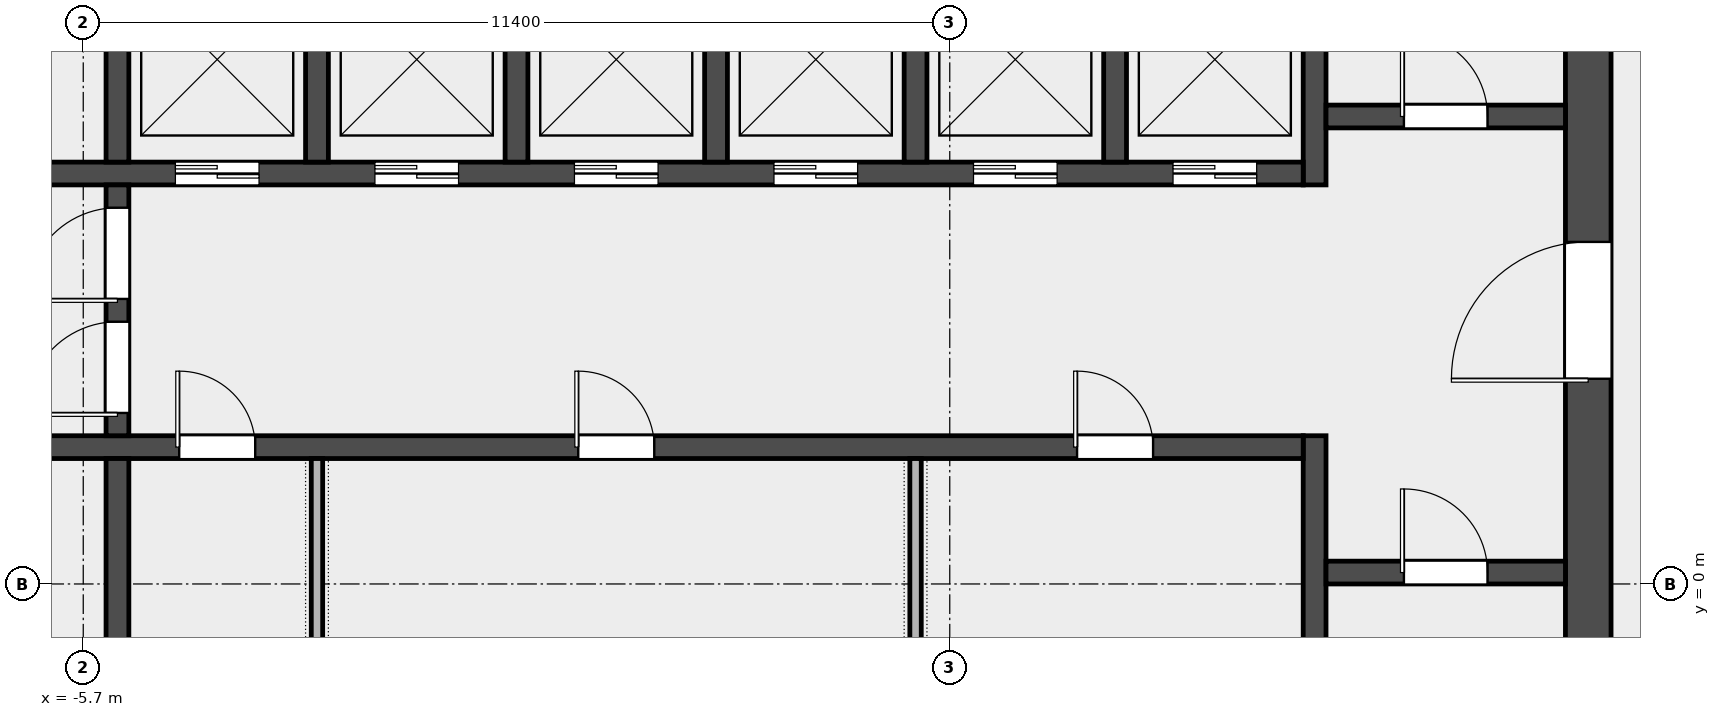
"""IFC4 building model, lengths in metres.
Left out: names, types, materials, properties, quantities, classifications, styles, units other than length and angle.
Written with IfcOpenShell. Run it as: python <this file> out.ifc"""

import sys

from ifc_helpers import new_model, si_unit, direction, frame, frame_2d, origin, place, context, subcontext, project, spatial, rectangle, extrude, element, fill, save


model = new_model("IFC4")
c1 = context("Model", 3, precision=1e-05, world=origin(), true_north=direction((0.0, 1.0)))
c2 = subcontext(c1, "Body", "Model", "MODEL_VIEW")
j1 = project(units=[si_unit("LENGTHUNIT", "METRE"), si_unit("PLANEANGLEUNIT", "RADIAN")], contexts=[c1])
p1 = place(None, origin())
s1 = spatial("IfcSite", under=j1, at=p1, CompositionType="ELEMENT")
p2 = place(p1, origin())
s2 = spatial("IfcBuilding", under=s1, at=p2, CompositionType="ELEMENT")
p3 = place(p2, frame((0.0, 0.0, 287.4)))
s3 = spatial("IfcBuildingStorey", under=s2, at=p3, CompositionType="ELEMENT", Elevation=287.4)
p4 = place(p3, frame((14.1, -6.6, 0.0), z_axis=(0.0, 0.0, 1.0), x_axis=(0.0, 1.0, 0.0)))
e1 = element("IfcWall", 1, at=p4, inside=s3, PredefinedType="SHEAR", context=c2, shape_type="SweptSolid", body=[
    extrude(rectangle(XDim=19.5, YDim=0.6, at=frame_2d((9.75, 0.0))), origin(), (0.0, 0.0, 1.0), 3.7),
])
p5 = place(p4, frame((9.3, 0.0, 0.0)))
e2 = element("IfcOpeningElement", 2, at=p5, cuts=e1, PredefinedType="OPENING", context=c2, shape_type="SweptSolid", body=[
    extrude(rectangle(XDim=1.8, YDim=2.1, at=frame_2d((0.9, 1.05))), frame((0.0, 0.312, 0.0), z_axis=(0.0, -1.0, 0.0), x_axis=(1.0, 0.0, 0.0)), (0.0, 0.0, 1.0), 0.624),
])
p6 = place(p3, frame((10.5, -6.6, 0.0), z_axis=(0.0, 0.0, 1.0), x_axis=(0.0, 1.0, 0.0)))
e3 = element("IfcWall", 3, at=p6, inside=s3, PredefinedType="SHEAR", context=c2, shape_type="SweptSolid", body=[
    extrude(rectangle(XDim=8.55, YDim=0.3, at=frame_2d((4.275, 0.0))), origin(), (0.0, 0.0, 1.0), 3.7),
])
p7 = place(p3, frame((10.5, 5.25, 0.0), z_axis=(0.0, 0.0, 1.0), x_axis=(0.0, 1.0, 0.0)))
e4 = element("IfcWall", 4, at=p7, inside=s3, PredefinedType="SHEAR", context=c2, shape_type="SweptSolid", body=[
    extrude(rectangle(XDim=7.65, YDim=0.3, at=frame_2d((3.825, 0.0))), origin(), (0.0, 0.0, 1.0), 3.7),
])
p8 = place(p3, frame((10.65, 0.15, 0.0), z_axis=(0.0, 0.0, 1.0), x_axis=(1.0, 0.0, 0.0)))
e5 = element("IfcWall", 5, at=p8, inside=s3, PredefinedType="SOLIDWALL", context=c2, shape_type="SweptSolid", body=[
    extrude(rectangle(XDim=3.15, YDim=0.3, at=frame_2d((1.575, 0.0))), origin(), (0.0, 0.0, 1.0), 3.7),
])
p9 = place(p8, frame((1.025, 0.0, 0.0)))
e6 = element("IfcOpeningElement", 6, at=p9, cuts=e5, PredefinedType="OPENING", context=c2, shape_type="SweptSolid", body=[
    extrude(rectangle(XDim=1.1, YDim=2.1, at=frame_2d((0.55, 1.05))), frame((0.0, 0.162, 0.0), z_axis=(0.0, -1.0, 0.0), x_axis=(1.0, 0.0, 0.0)), (0.0, 0.0, 1.0), 0.324),
])
p10 = place(p3, frame((10.65, 6.15, 0.0), z_axis=(0.0, 0.0, 1.0), x_axis=(1.0, 0.0, 0.0)))
e7 = element("IfcWall", 7, at=p10, inside=s3, PredefinedType="SOLIDWALL", context=c2, shape_type="SweptSolid", body=[
    extrude(rectangle(XDim=3.15, YDim=0.3, at=frame_2d((1.575, 0.0))), origin(), (0.0, 0.0, 1.0), 3.7),
])
p11 = place(p10, frame((1.025, 0.0, 0.0)))
e8 = element("IfcOpeningElement", 8, at=p11, cuts=e7, PredefinedType="OPENING", context=c2, shape_type="SweptSolid", body=[
    extrude(rectangle(XDim=1.1, YDim=2.1, at=frame_2d((0.55, 1.05))), frame((0.0, 0.162, 0.0), z_axis=(0.0, -1.0, 0.0), x_axis=(1.0, 0.0, 0.0)), (0.0, 0.0, 1.0), 0.324),
])
p12 = place(p3, frame((-10.35, 1.8, 0.0), z_axis=(0.0, 0.0, 1.0), x_axis=(1.0, 0.0, 0.0)))
e9 = element("IfcWall", 9, at=p12, inside=s3, PredefinedType="SOLIDWALL", context=c2, shape_type="SweptSolid", body=[
    extrude(rectangle(XDim=20.7, YDim=0.3, at=frame_2d((10.35, 0.0))), origin(), (0.0, 0.0, 1.0), 3.7),
])
p13 = place(p12, frame((0.512, 0.0, 0.0)))
e10 = element("IfcOpeningElement", 10, at=p13, cuts=e9, PredefinedType="OPENING", context=c2, shape_type="SweptSolid", body=[
    extrude(rectangle(XDim=1.3, YDim=2.1, at=frame_2d((0.65, 1.05))), frame((0.0, 0.162, 0.0), z_axis=(0.0, -1.0, 0.0), x_axis=(1.0, 0.0, 0.0)), (0.0, 0.0, 1.0), 0.324),
])
p14 = place(p12, frame((5.913, 0.0, 0.0)))
e11 = element("IfcOpeningElement", 11, at=p14, cuts=e9, PredefinedType="OPENING", context=c2, shape_type="SweptSolid", body=[
    extrude(rectangle(XDim=1.0, YDim=2.1, at=frame_2d((0.5, 1.05))), frame((0.0, 0.162, 0.0), z_axis=(0.0, -1.0, 0.0), x_axis=(1.0, 0.0, 0.0)), (0.0, 0.0, 1.0), 0.324),
])
p15 = place(p12, frame((11.163, 0.0, 0.0)))
e12 = element("IfcOpeningElement", 12, at=p15, cuts=e9, PredefinedType="OPENING", context=c2, shape_type="SweptSolid", body=[
    extrude(rectangle(XDim=1.0, YDim=2.1, at=frame_2d((0.5, 1.05))), frame((0.0, 0.162, 0.0), z_axis=(0.0, -1.0, 0.0), x_axis=(1.0, 0.0, 0.0)), (0.0, 0.0, 1.0), 0.324),
])
p16 = place(p12, frame((17.725, 0.0, 0.0)))
e13 = element("IfcOpeningElement", 13, at=p16, cuts=e9, PredefinedType="OPENING", context=c2, shape_type="SweptSolid", body=[
    extrude(rectangle(XDim=1.0, YDim=2.1, at=frame_2d((0.5, 1.05))), frame((0.0, 0.162, 0.0), z_axis=(0.0, -1.0, 0.0), x_axis=(1.0, 0.0, 0.0)), (0.0, 0.0, 1.0), 0.324),
])
p17 = place(p3, frame((-10.35, 5.4, 0.0), z_axis=(0.0, 0.0, 1.0), x_axis=(1.0, 0.0, 0.0)))
e14 = element("IfcWall", 14, at=p17, inside=s3, PredefinedType="SOLIDWALL", context=c2, shape_type="SweptSolid", body=[
    extrude(rectangle(XDim=20.7, YDim=0.3, at=frame_2d((10.35, 0.0))), origin(), (0.0, 0.0, 1.0), 3.7),
])
p18 = place(p17, frame((0.512, 0.0, 0.0)))
e15 = element("IfcOpeningElement", 15, at=p18, cuts=e14, PredefinedType="OPENING", context=c2, shape_type="SweptSolid", body=[
    extrude(rectangle(XDim=1.3, YDim=2.1, at=frame_2d((0.65, 1.05))), frame((0.0, 0.162, 0.0), z_axis=(0.0, -1.0, 0.0), x_axis=(1.0, 0.0, 0.0)), (0.0, 0.0, 1.0), 0.324),
])
p19 = place(p17, frame((5.863, 0.0, 0.0)))
e16 = element("IfcOpeningElement", 16, at=p19, cuts=e14, PredefinedType="OPENING", context=c2, shape_type="SweptSolid", body=[
    extrude(rectangle(XDim=1.1, YDim=2.1, at=frame_2d((0.55, 1.05))), frame((0.0, 0.162, 0.0), z_axis=(0.0, -1.0, 0.0), x_axis=(1.0, 0.0, 0.0)), (0.0, 0.0, 1.0), 0.324),
])
p20 = place(p17, frame((8.488, 0.0, 0.0)))
e17 = element("IfcOpeningElement", 17, at=p20, cuts=e14, PredefinedType="OPENING", context=c2, shape_type="SweptSolid", body=[
    extrude(rectangle(XDim=1.1, YDim=2.1, at=frame_2d((0.55, 1.05))), frame((0.0, 0.162, 0.0), z_axis=(0.0, -1.0, 0.0), x_axis=(1.0, 0.0, 0.0)), (0.0, 0.0, 1.0), 0.324),
])
p21 = place(p17, frame((11.113, 0.0, 0.0)))
e18 = element("IfcOpeningElement", 18, at=p21, cuts=e14, PredefinedType="OPENING", context=c2, shape_type="SweptSolid", body=[
    extrude(rectangle(XDim=1.1, YDim=2.1, at=frame_2d((0.55, 1.05))), frame((0.0, 0.162, 0.0), z_axis=(0.0, -1.0, 0.0), x_axis=(1.0, 0.0, 0.0)), (0.0, 0.0, 1.0), 0.324),
])
p22 = place(p17, frame((13.738, 0.0, 0.0)))
e19 = element("IfcOpeningElement", 19, at=p22, cuts=e14, PredefinedType="OPENING", context=c2, shape_type="SweptSolid", body=[
    extrude(rectangle(XDim=1.1, YDim=2.1, at=frame_2d((0.55, 1.05))), frame((0.0, 0.162, 0.0), z_axis=(0.0, -1.0, 0.0), x_axis=(1.0, 0.0, 0.0)), (0.0, 0.0, 1.0), 0.324),
])
p23 = place(p17, frame((16.363, 0.0, 0.0)))
e20 = element("IfcOpeningElement", 20, at=p23, cuts=e14, PredefinedType="OPENING", context=c2, shape_type="SweptSolid", body=[
    extrude(rectangle(XDim=1.1, YDim=2.1, at=frame_2d((0.55, 1.05))), frame((0.0, 0.162, 0.0), z_axis=(0.0, -1.0, 0.0), x_axis=(1.0, 0.0, 0.0)), (0.0, 0.0, 1.0), 0.324),
])
p24 = place(p17, frame((18.988, 0.0, 0.0)))
e21 = element("IfcOpeningElement", 21, at=p24, cuts=e14, PredefinedType="OPENING", context=c2, shape_type="SweptSolid", body=[
    extrude(rectangle(XDim=1.1, YDim=2.1, at=frame_2d((0.55, 1.05))), frame((0.0, 0.162, 0.0), z_axis=(0.0, -1.0, 0.0), x_axis=(1.0, 0.0, 0.0)), (0.0, 0.0, 1.0), 0.324),
])
for number, where, z_axis, x_axis in (
    (22, (-5.25, -1.05, 0.0), (0.0, 0.0, 1.0), (0.0, 1.0, 0.0)),
    (23, (-5.25, 5.55, 0.0), (0.0, 0.0, 1.0), (0.0, 1.0, 0.0)),
    (24, (-2.625, 5.55, 0.0), (0.0, 0.0, 1.0), (0.0, 1.0, 0.0)),
    (25, (0.0, 5.55, 0.0), (0.0, 0.0, 1.0), (0.0, 1.0, 0.0)),
    (26, (2.625, 5.55, 0.0), (0.0, 0.0, 1.0), (0.0, 1.0, 0.0)),
    (27, (5.25, 5.55, 0.0), (0.0, 0.0, 1.0), (0.0, 1.0, 0.0)),
    (28, (7.875, 5.55, 0.0), (0.0, 0.0, 1.0), (0.0, 1.0, 0.0)),
):
    element("IfcWall", number, at=place(p3, frame(where, z_axis=z_axis, x_axis=x_axis)), inside=s3, PredefinedType="SOLIDWALL", context=c2, shape_type="SweptSolid", body=[
        extrude(rectangle(XDim=2.7, YDim=0.3, at=frame_2d((1.35, 0.0))), origin(), (0.0, 0.0, 1.0), 3.7),
    ])
p25 = place(p3, frame((-5.25, 1.95, 0.0), z_axis=(0.0, 0.0, 1.0), x_axis=(0.0, 1.0, 0.0)))
e29 = element("IfcWall", 29, at=p25, inside=s3, PredefinedType="SOLIDWALL", context=c2, shape_type="SweptSolid", body=[
    extrude(rectangle(XDim=3.3, YDim=0.3, at=frame_2d((1.65, 0.0))), origin(), (0.0, 0.0, 1.0), 3.7),
])
p26 = place(p25, frame((0.3, 0.0, 0.0)))
e30 = element("IfcOpeningElement", 30, at=p26, cuts=e29, PredefinedType="OPENING", context=c2, shape_type="SweptSolid", body=[
    extrude(rectangle(XDim=1.2, YDim=2.1, at=frame_2d((0.6, 1.05))), frame((0.0, 0.162, 0.0), z_axis=(0.0, -1.0, 0.0), x_axis=(1.0, 0.0, 0.0)), (0.0, 0.0, 1.0), 0.324),
])
p27 = place(p25, frame((1.8, 0.0, 0.0)))
e31 = element("IfcOpeningElement", 31, at=p27, cuts=e29, PredefinedType="OPENING", context=c2, shape_type="SweptSolid", body=[
    extrude(rectangle(XDim=1.2, YDim=2.1, at=frame_2d((0.6, 1.05))), frame((0.0, 0.162, 0.0), z_axis=(0.0, -1.0, 0.0), x_axis=(1.0, 0.0, 0.0)), (0.0, 0.0, 1.0), 0.324),
])
for number, where, z_axis, x_axis in (
    (32, (-2.625, -1.05, 0.0), (0.0, 0.0, 1.0), (0.0, 1.0, 0.0)),
    (33, (5.25, -1.05, 0.0), (0.0, 0.0, 1.0), (0.0, 1.0, 0.0)),
):
    element("IfcWall", number, at=place(p3, frame(where, z_axis=z_axis, x_axis=x_axis)), inside=s3, PredefinedType="PARTITIONING", context=c2, shape_type="SweptSolid", body=[
        extrude(rectangle(XDim=2.7, YDim=0.15, at=frame_2d((1.35, 0.0))), origin(), (0.0, 0.0, 1.0), 3.7),
    ])
p28 = place(p9, origin())
e34 = element("IfcDoor", 34, at=p28, inside=s3, OperationType="SINGLE_SWING_RIGHT", PredefinedType="DOOR", context=c2, shape_type="SweptSolid", body=[
    extrude(rectangle(XDim=1.1, YDim=2.1, at=frame_2d((0.55, 1.05))), frame((0.0, 0.025, 0.0), z_axis=(0.0, -1.0, 0.0), x_axis=(1.0, 0.0, 0.0)), (0.0, 0.0, 1.0), 0.05),
])
fill(e6, e34)
p29 = place(p11, origin())
e35 = element("IfcDoor", 35, at=p29, inside=s3, OperationType="SINGLE_SWING_RIGHT", PredefinedType="DOOR", context=c2, shape_type="SweptSolid", body=[
    extrude(rectangle(XDim=1.1, YDim=2.1, at=frame_2d((0.55, 1.05))), frame((0.0, 0.025, 0.0), z_axis=(0.0, -1.0, 0.0), x_axis=(1.0, 0.0, 0.0)), (0.0, 0.0, 1.0), 0.05),
])
fill(e8, e35)
p30 = place(p5, origin())
e36 = element("IfcDoor", 36, at=p30, inside=s3, OperationType="DOUBLE_DOOR_SINGLE_SWING", PredefinedType="DOOR", context=c2, shape_type="SweptSolid", body=[
    extrude(rectangle(XDim=1.8, YDim=2.1, at=frame_2d((0.9, 1.05))), frame((0.0, 0.025, 0.0), z_axis=(0.0, -1.0, 0.0), x_axis=(1.0, 0.0, 0.0)), (0.0, 0.0, 1.0), 0.05),
])
fill(e2, e36)
p31 = place(p26, origin())
e37 = element("IfcDoor", 37, at=p31, inside=s3, OperationType="SINGLE_SWING_LEFT", PredefinedType="DOOR", context=c2, shape_type="SweptSolid", body=[
    extrude(rectangle(XDim=1.2, YDim=2.1, at=frame_2d((0.6, 1.05))), frame((0.0, 0.025, 0.0), z_axis=(0.0, -1.0, 0.0), x_axis=(1.0, 0.0, 0.0)), (0.0, 0.0, 1.0), 0.05),
])
fill(e30, e37)
p32 = place(p27, origin())
e38 = element("IfcDoor", 38, at=p32, inside=s3, OperationType="SINGLE_SWING_RIGHT", PredefinedType="DOOR", context=c2, shape_type="SweptSolid", body=[
    extrude(rectangle(XDim=1.2, YDim=2.1, at=frame_2d((0.6, 1.05))), frame((0.0, 0.025, 0.0), z_axis=(0.0, -1.0, 0.0), x_axis=(1.0, 0.0, 0.0)), (0.0, 0.0, 1.0), 0.05),
])
fill(e31, e38)
p33 = place(p19, origin())
e39 = element("IfcDoor", 39, at=p33, inside=s3, OperationType="DOUBLE_DOOR_SLIDING", PredefinedType="DOOR", context=c2, shape_type="SweptSolid", body=[
    extrude(rectangle(XDim=1.1, YDim=2.1, at=frame_2d((0.55, 1.05))), frame((0.0, 0.025, 0.0), z_axis=(0.0, -1.0, 0.0), x_axis=(1.0, 0.0, 0.0)), (0.0, 0.0, 1.0), 0.05),
])
fill(e16, e39)
p34 = place(p20, origin())
e40 = element("IfcDoor", 40, at=p34, inside=s3, OperationType="DOUBLE_DOOR_SLIDING", PredefinedType="DOOR", context=c2, shape_type="SweptSolid", body=[
    extrude(rectangle(XDim=1.1, YDim=2.1, at=frame_2d((0.55, 1.05))), frame((0.0, 0.025, 0.0), z_axis=(0.0, -1.0, 0.0), x_axis=(1.0, 0.0, 0.0)), (0.0, 0.0, 1.0), 0.05),
])
fill(e17, e40)
p35 = place(p21, origin())
e41 = element("IfcDoor", 41, at=p35, inside=s3, OperationType="DOUBLE_DOOR_SLIDING", PredefinedType="DOOR", context=c2, shape_type="SweptSolid", body=[
    extrude(rectangle(XDim=1.1, YDim=2.1, at=frame_2d((0.55, 1.05))), frame((0.0, 0.025, 0.0), z_axis=(0.0, -1.0, 0.0), x_axis=(1.0, 0.0, 0.0)), (0.0, 0.0, 1.0), 0.05),
])
fill(e18, e41)
p36 = place(p22, origin())
e42 = element("IfcDoor", 42, at=p36, inside=s3, OperationType="DOUBLE_DOOR_SLIDING", PredefinedType="DOOR", context=c2, shape_type="SweptSolid", body=[
    extrude(rectangle(XDim=1.1, YDim=2.1, at=frame_2d((0.55, 1.05))), frame((0.0, 0.025, 0.0), z_axis=(0.0, -1.0, 0.0), x_axis=(1.0, 0.0, 0.0)), (0.0, 0.0, 1.0), 0.05),
])
fill(e19, e42)
p37 = place(p23, origin())
e43 = element("IfcDoor", 43, at=p37, inside=s3, OperationType="DOUBLE_DOOR_SLIDING", PredefinedType="DOOR", context=c2, shape_type="SweptSolid", body=[
    extrude(rectangle(XDim=1.1, YDim=2.1, at=frame_2d((0.55, 1.05))), frame((0.0, 0.025, 0.0), z_axis=(0.0, -1.0, 0.0), x_axis=(1.0, 0.0, 0.0)), (0.0, 0.0, 1.0), 0.05),
])
fill(e20, e43)
p38 = place(p24, origin())
e44 = element("IfcDoor", 44, at=p38, inside=s3, OperationType="DOUBLE_DOOR_SLIDING", PredefinedType="DOOR", context=c2, shape_type="SweptSolid", body=[
    extrude(rectangle(XDim=1.1, YDim=2.1, at=frame_2d((0.55, 1.05))), frame((0.0, 0.025, 0.0), z_axis=(0.0, -1.0, 0.0), x_axis=(1.0, 0.0, 0.0)), (0.0, 0.0, 1.0), 0.05),
])
fill(e21, e44)
p39 = place(p14, origin())
e45 = element("IfcDoor", 45, at=p39, inside=s3, OperationType="SINGLE_SWING_LEFT", PredefinedType="DOOR", context=c2, shape_type="SweptSolid", body=[
    extrude(rectangle(XDim=1.0, YDim=2.1, at=frame_2d((0.5, 1.05))), frame((0.0, 0.025, 0.0), z_axis=(0.0, -1.0, 0.0), x_axis=(1.0, 0.0, 0.0)), (0.0, 0.0, 1.0), 0.05),
])
fill(e11, e45)
p40 = place(p15, origin())
e46 = element("IfcDoor", 46, at=p40, inside=s3, OperationType="SINGLE_SWING_LEFT", PredefinedType="DOOR", context=c2, shape_type="SweptSolid", body=[
    extrude(rectangle(XDim=1.0, YDim=2.1, at=frame_2d((0.5, 1.05))), frame((0.0, 0.025, 0.0), z_axis=(0.0, -1.0, 0.0), x_axis=(1.0, 0.0, 0.0)), (0.0, 0.0, 1.0), 0.05),
])
fill(e12, e46)
p41 = place(p16, origin())
e47 = element("IfcDoor", 47, at=p41, inside=s3, OperationType="SINGLE_SWING_LEFT", PredefinedType="DOOR", context=c2, shape_type="SweptSolid", body=[
    extrude(rectangle(XDim=1.0, YDim=2.1, at=frame_2d((0.5, 1.05))), frame((0.0, 0.025, 0.0), z_axis=(0.0, -1.0, 0.0), x_axis=(1.0, 0.0, 0.0)), (0.0, 0.0, 1.0), 0.05),
])
fill(e13, e47)
save(model, sys.argv[1])
